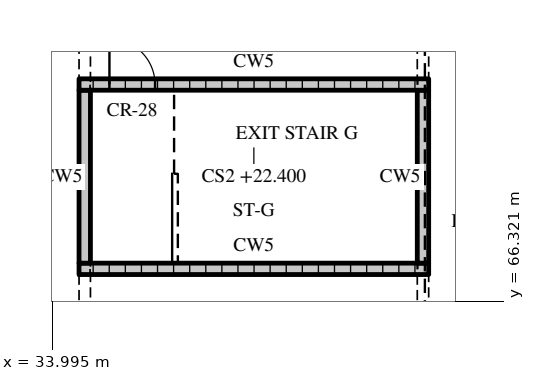
"""IFC4 building model, lengths in metres.
Left out: names, types, materials, properties, quantities, classifications, styles, units other than length and angle.
Written with IfcOpenShell. Run it as: python <this file> out.ifc"""

import sys

from ifc_helpers import new_model, si_unit, direction, frame, frame_2d, origin, place, context, subcontext, project, spatial, rectangle, extrude, element, fill, save


model = new_model("IFC4")
c1 = context("Model", 3, precision=1e-05, world=origin(), true_north=direction((0.0, 1.0)))
c2 = subcontext(c1, "Body", "Model", "MODEL_VIEW")
j1 = project(units=[si_unit("LENGTHUNIT", "METRE"), si_unit("PLANEANGLEUNIT", "RADIAN")], contexts=[c1])
p1 = place(None, origin())
s1 = spatial("IfcSite", under=j1, at=p1, CompositionType="ELEMENT")
p2 = place(p1, origin())
s2 = spatial("IfcBuilding", under=s1, at=p2, CompositionType="ELEMENT")
p3 = place(p2, frame((0.0, 0.0, 19.2)))
s3 = spatial("IfcBuildingStorey", under=s2, at=p3, CompositionType="ELEMENT", Elevation=19.2)
p4 = place(p3, frame((34.7, 67.175, 0.0), z_axis=(0.0, 0.0, 1.0), x_axis=(1.0, 0.0, 0.0)))
e1 = element("IfcWall", 1, at=p4, inside=s3, PredefinedType="SOLIDWALL", context=c2, shape_type="SweptSolid", body=[
    extrude(rectangle(XDim=9.2, YDim=0.3, at=frame_2d((4.6, 0.0))), origin(), (0.0, 0.0, 1.0), 3.0),
])
for number, where, z_axis, x_axis in (
    (2, (34.85, 67.325, 0.0), (0.0, 0.0, 1.0), (0.0, 1.0, 0.0)),
    (3, (43.75, 67.325, 0.0), (0.0, 0.0, 1.0), (0.0, 1.0, 0.0)),
):
    element("IfcWall", number, at=place(p3, frame(where, z_axis=z_axis, x_axis=x_axis)), inside=s3, PredefinedType="SOLIDWALL", context=c2, shape_type="SweptSolid", body=[
        extrude(rectangle(XDim=4.55, YDim=0.3, at=frame_2d((2.275, 0.0))), origin(), (0.0, 0.0, 1.0), 3.0),
    ])
p5 = place(p3, frame((34.7, 72.025, 0.0), z_axis=(0.0, 0.0, 1.0), x_axis=(1.0, 0.0, 0.0)))
e4 = element("IfcWall", 4, at=p5, inside=s3, PredefinedType="SOLIDWALL", context=c2, shape_type="SweptSolid", body=[
    extrude(rectangle(XDim=9.2, YDim=0.3, at=frame_2d((4.6, 0.0))), origin(), (0.0, 0.0, 1.0), 3.0),
])
p6 = place(p5, frame((0.8, 0.0, 0.0)))
e5 = element("IfcOpeningElement", 5, at=p6, cuts=e4, PredefinedType="OPENING", context=c2, shape_type="SweptSolid", body=[
    extrude(rectangle(XDim=1.2, YDim=2.1, at=frame_2d((0.6, 1.05))), frame((0.0, 0.16, 0.0), z_axis=(0.0, -1.0, 0.0), x_axis=(1.0, 0.0, 0.0)), (0.0, 0.0, 1.0), 0.32),
])
p7 = place(p6, origin())
e6 = element("IfcDoor", 6, at=p7, inside=s3, OperationType="SINGLE_SWING_LEFT", PredefinedType="DOOR", context=c2, shape_type="SweptSolid", body=[
    extrude(rectangle(XDim=1.2, YDim=2.1, at=frame_2d((0.6, 1.05))), frame((0.0, 0.025, 0.0), z_axis=(0.0, -1.0, 0.0), x_axis=(1.0, 0.0, 0.0)), (0.0, 0.0, 1.0), 0.05),
])
fill(e5, e6)
save(model, sys.argv[1])
